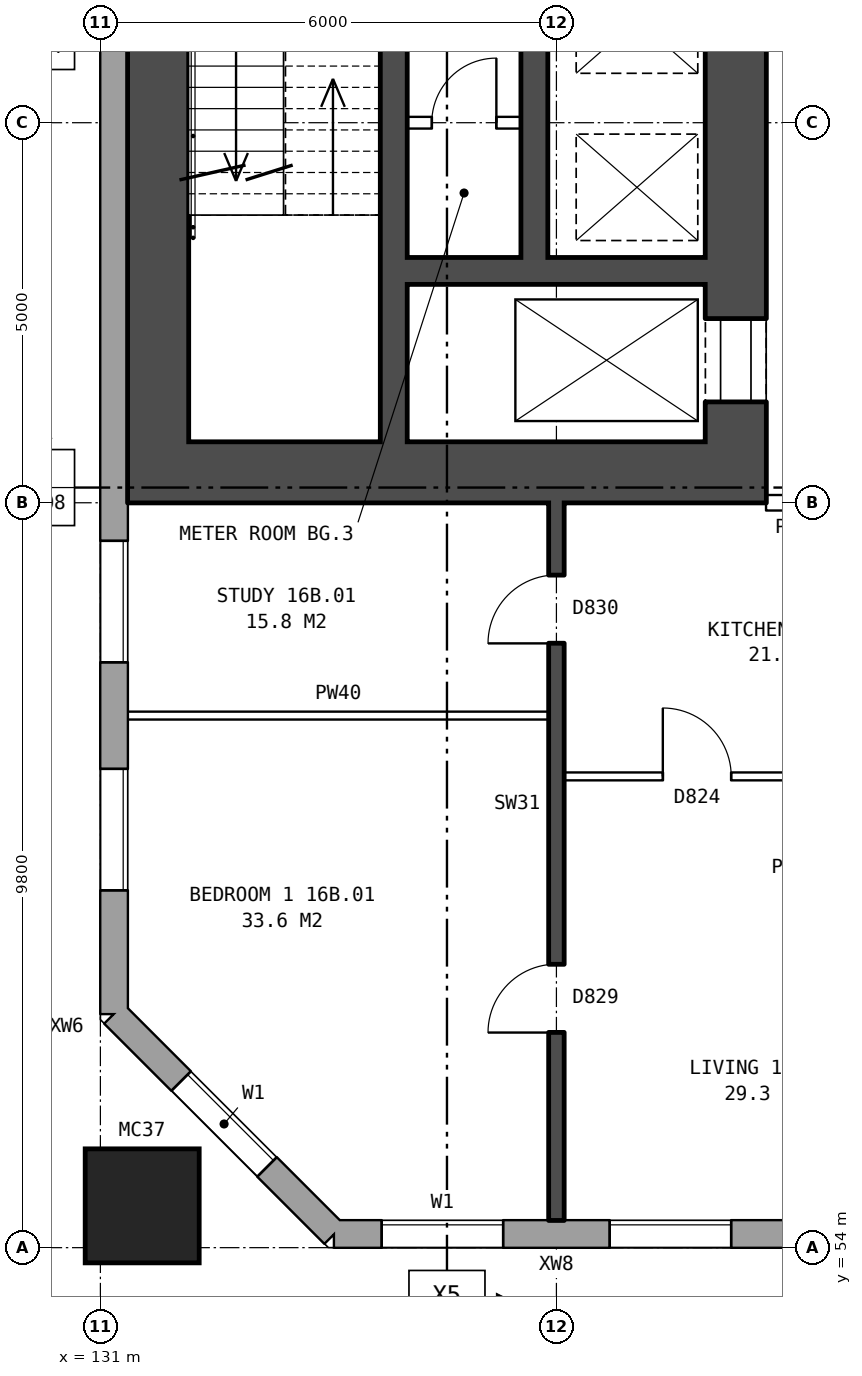
"""IFC4 building model, lengths in metres.
Left out: names, types, materials, properties, quantities, classifications, styles, units other than length and angle.
Written with IfcOpenShell. Run it as: python <this file> out.ifc"""

import sys

from ifc_helpers import new_model, si_unit, direction, frame, frame_2d, origin, origin_2d, place, context, subcontext, project, spatial, rectangle, hollow_rectangle, extrude, element, fill, save


model = new_model("IFC4")
c1 = context("Model", 3, precision=1e-05, world=origin(), true_north=direction((0.0, 1.0)))
c2 = subcontext(c1, "Body", "Model", "MODEL_VIEW")
j1 = project(units=[si_unit("LENGTHUNIT", "METRE"), si_unit("PLANEANGLEUNIT", "RADIAN")], contexts=[c1])
p1 = place(None, origin())
s1 = spatial("IfcSite", under=j1, at=p1, CompositionType="ELEMENT")
p2 = place(p1, origin())
s2 = spatial("IfcBuilding", under=s1, at=p2, CompositionType="ELEMENT")
p3 = place(p2, frame((0.0, 0.0, 59.8)))
s3 = spatial("IfcBuildingStorey", under=s2, at=p3, CompositionType="ELEMENT", Elevation=59.8)
p4 = place(p3, frame((131.55, 54.55, 0.0), z_axis=(0.0, 0.0, 1.0), x_axis=(1.0, 0.0, 0.0)))
e1 = element("IfcColumn", 1, at=p4, inside=s3, PredefinedType="COLUMN", context=c2, shape_type="SweptSolid", body=[
    extrude(hollow_rectangle(XDim=1.5, YDim=1.5, WallThickness=0.08, at=origin_2d()), origin(), (0.0, 0.0, 1.0), 3.1),
])
p5 = place(p3, frame((131.18, 57.075, 0.0), z_axis=(0.0, 0.0, 1.0), x_axis=(0.707106781187, -0.707106781187, 0.0)))
e2 = element("IfcWall", 2, at=p5, inside=s3, PredefinedType="STANDARD", context=c2, shape_type="SweptSolid", body=[
    extrude(rectangle(XDim=4.094, YDim=0.36, at=frame_2d((2.047, 0.0))), origin(), (0.0, 0.0, 1.0), 2.85),
])
p6 = place(p5, frame((1.247, 0.0, 0.8)))
e3 = element("IfcOpeningElement", 3, at=p6, cuts=e2, PredefinedType="OPENING", context=c2, shape_type="SweptSolid", body=[
    extrude(rectangle(XDim=1.6, YDim=1.8, at=frame_2d((0.8, 0.9))), frame((0.0, 0.19, 0.0), z_axis=(0.0, -1.0, 0.0), x_axis=(1.0, 0.0, 0.0)), (0.0, 0.0, 1.0), 0.38),
])
p7 = place(p3, frame((134.075, 54.18, 0.0), z_axis=(0.0, 0.0, 1.0), x_axis=(1.0, 0.0, 0.0)))
e4 = element("IfcWall", 4, at=p7, inside=s3, PredefinedType="STANDARD", context=c2, shape_type="SweptSolid", body=[
    extrude(rectangle(XDim=39.351, YDim=0.36, at=frame_2d((19.675, 0.0))), origin(), (0.0, 0.0, 1.0), 2.85),
])
p8 = place(p7, frame((0.625, 0.0, 0.8)))
e5 = element("IfcOpeningElement", 5, at=p8, cuts=e4, PredefinedType="OPENING", context=c2, shape_type="SweptSolid", body=[
    extrude(rectangle(XDim=1.6, YDim=1.8, at=frame_2d((0.8, 0.9))), frame((0.0, 0.19, 0.0), z_axis=(0.0, -1.0, 0.0), x_axis=(1.0, 0.0, 0.0)), (0.0, 0.0, 1.0), 0.38),
])
p9 = place(p7, frame((3.625, 0.0, 0.8)))
e6 = element("IfcOpeningElement", 6, at=p9, cuts=e4, PredefinedType="OPENING", context=c2, shape_type="SweptSolid", body=[
    extrude(rectangle(XDim=1.6, YDim=1.8, at=frame_2d((0.8, 0.9))), frame((0.0, 0.19, 0.0), z_axis=(0.0, -1.0, 0.0), x_axis=(1.0, 0.0, 0.0)), (0.0, 0.0, 1.0), 0.38),
])
p10 = place(p7, frame((6.625, 0.0, 0.8)))
e7 = element("IfcOpeningElement", 7, at=p10, cuts=e4, PredefinedType="OPENING", context=c2, shape_type="SweptSolid", body=[
    extrude(rectangle(XDim=1.6, YDim=1.8, at=frame_2d((0.8, 0.9))), frame((0.0, 0.19, 0.0), z_axis=(0.0, -1.0, 0.0), x_axis=(1.0, 0.0, 0.0)), (0.0, 0.0, 1.0), 0.38),
])
p11 = place(p7, frame((9.625, 0.0, 0.8)))
e8 = element("IfcOpeningElement", 8, at=p11, cuts=e4, PredefinedType="OPENING", context=c2, shape_type="SweptSolid", body=[
    extrude(rectangle(XDim=1.6, YDim=1.8, at=frame_2d((0.8, 0.9))), frame((0.0, 0.19, 0.0), z_axis=(0.0, -1.0, 0.0), x_axis=(1.0, 0.0, 0.0)), (0.0, 0.0, 1.0), 0.38),
])
p12 = place(p7, frame((12.625, 0.0, 0.8)))
e9 = element("IfcOpeningElement", 9, at=p12, cuts=e4, PredefinedType="OPENING", context=c2, shape_type="SweptSolid", body=[
    extrude(rectangle(XDim=1.6, YDim=1.8, at=frame_2d((0.8, 0.9))), frame((0.0, 0.19, 0.0), z_axis=(0.0, -1.0, 0.0), x_axis=(1.0, 0.0, 0.0)), (0.0, 0.0, 1.0), 0.38),
])
p13 = place(p7, frame((15.125, 0.0, 0.8)))
e10 = element("IfcOpeningElement", 10, at=p13, cuts=e4, PredefinedType="OPENING", context=c2, shape_type="SweptSolid", body=[
    extrude(rectangle(XDim=1.6, YDim=1.8, at=frame_2d((0.8, 0.9))), frame((0.0, 0.19, 0.0), z_axis=(0.0, -1.0, 0.0), x_axis=(1.0, 0.0, 0.0)), (0.0, 0.0, 1.0), 0.38),
])
p14 = place(p7, frame((18.275, 0.0, 0.15)))
e11 = element("IfcOpeningElement", 11, at=p14, cuts=e4, PredefinedType="OPENING", context=c2, shape_type="SweptSolid", body=[
    extrude(rectangle(XDim=0.6, YDim=0.9, at=frame_2d((0.3, 0.45))), frame((0.0, 0.19, 0.0), z_axis=(0.0, -1.0, 0.0), x_axis=(1.0, 0.0, 0.0)), (0.0, 0.0, 1.0), 0.38),
])
p15 = place(p7, frame((21.525, 0.0, 1.7)))
e12 = element("IfcOpeningElement", 12, at=p15, cuts=e4, PredefinedType="OPENING", context=c2, shape_type="SweptSolid", body=[
    extrude(rectangle(XDim=0.6, YDim=0.9, at=frame_2d((0.3, 0.45))), frame((0.0, 0.19, 0.0), z_axis=(0.0, -1.0, 0.0), x_axis=(1.0, 0.0, 0.0)), (0.0, 0.0, 1.0), 0.38),
])
p16 = place(p7, frame((24.625, 0.0, 0.8)))
e13 = element("IfcOpeningElement", 13, at=p16, cuts=e4, PredefinedType="OPENING", context=c2, shape_type="SweptSolid", body=[
    extrude(rectangle(XDim=1.6, YDim=1.8, at=frame_2d((0.8, 0.9))), frame((0.0, 0.19, 0.0), z_axis=(0.0, -1.0, 0.0), x_axis=(1.0, 0.0, 0.0)), (0.0, 0.0, 1.0), 0.38),
])
p17 = place(p7, frame((27.625, 0.0, 0.8)))
e14 = element("IfcOpeningElement", 14, at=p17, cuts=e4, PredefinedType="OPENING", context=c2, shape_type="SweptSolid", body=[
    extrude(rectangle(XDim=1.6, YDim=1.8, at=frame_2d((0.8, 0.9))), frame((0.0, 0.19, 0.0), z_axis=(0.0, -1.0, 0.0), x_axis=(1.0, 0.0, 0.0)), (0.0, 0.0, 1.0), 0.38),
])
p18 = place(p7, frame((30.625, 0.0, 0.8)))
e15 = element("IfcOpeningElement", 15, at=p18, cuts=e4, PredefinedType="OPENING", context=c2, shape_type="SweptSolid", body=[
    extrude(rectangle(XDim=1.6, YDim=1.8, at=frame_2d((0.8, 0.9))), frame((0.0, 0.19, 0.0), z_axis=(0.0, -1.0, 0.0), x_axis=(1.0, 0.0, 0.0)), (0.0, 0.0, 1.0), 0.38),
])
p19 = place(p7, frame((33.625, 0.0, 0.8)))
e16 = element("IfcOpeningElement", 16, at=p19, cuts=e4, PredefinedType="OPENING", context=c2, shape_type="SweptSolid", body=[
    extrude(rectangle(XDim=1.6, YDim=1.8, at=frame_2d((0.8, 0.9))), frame((0.0, 0.19, 0.0), z_axis=(0.0, -1.0, 0.0), x_axis=(1.0, 0.0, 0.0)), (0.0, 0.0, 1.0), 0.38),
])
p20 = place(p7, frame((36.625, 0.0, 0.8)))
e17 = element("IfcOpeningElement", 17, at=p20, cuts=e4, PredefinedType="OPENING", context=c2, shape_type="SweptSolid", body=[
    extrude(rectangle(XDim=1.6, YDim=1.8, at=frame_2d((0.8, 0.9))), frame((0.0, 0.19, 0.0), z_axis=(0.0, -1.0, 0.0), x_axis=(1.0, 0.0, 0.0)), (0.0, 0.0, 1.0), 0.38),
])
p21 = place(p7, frame((17.025, 0.0, 1.6)))
e18 = element("IfcOpeningElement", 18, at=p21, cuts=e4, PredefinedType="OPENING", context=c2, shape_type="SweptSolid", body=[
    extrude(rectangle(XDim=0.6, YDim=0.9, at=frame_2d((0.3, 0.45))), frame((0.0, 0.19, 0.0), z_axis=(0.0, -1.0, 0.0), x_axis=(1.0, 0.0, 0.0)), (0.0, 0.0, 1.0), 0.38),
])
p22 = place(p7, frame((19.175, 0.0, 0.25)))
e19 = element("IfcOpeningElement", 19, at=p22, cuts=e4, PredefinedType="OPENING", context=c2, shape_type="SweptSolid", body=[
    extrude(rectangle(XDim=1.4, YDim=1.2, at=frame_2d((0.7, 0.6))), frame((0.0, 0.19, 0.0), z_axis=(0.0, -1.0, 0.0), x_axis=(1.0, 0.0, 0.0)), (0.0, 0.0, 1.0), 0.38),
])
p23 = place(p7, frame((22.425, 0.0, 1.0)))
e20 = element("IfcOpeningElement", 20, at=p23, cuts=e4, PredefinedType="OPENING", context=c2, shape_type="SweptSolid", body=[
    extrude(rectangle(XDim=0.6, YDim=1.5, at=frame_2d((0.3, 0.75))), frame((0.0, 0.19, 0.0), z_axis=(0.0, -1.0, 0.0), x_axis=(1.0, 0.0, 0.0)), (0.0, 0.0, 1.0), 0.38),
])
p24 = place(p7, frame((23.325, 0.0, 0.8)))
e21 = element("IfcOpeningElement", 21, at=p24, cuts=e4, PredefinedType="OPENING", context=c2, shape_type="SweptSolid", body=[
    extrude(rectangle(XDim=1.0, YDim=1.8, at=frame_2d((0.5, 0.9))), frame((0.0, 0.19, 0.0), z_axis=(0.0, -1.0, 0.0), x_axis=(1.0, 0.0, 0.0)), (0.0, 0.0, 1.0), 0.38),
])
p25 = place(p3, frame((131.18, 82.925, 0.0), z_axis=(0.0, 0.0, 1.0), x_axis=(0.0, -1.0, 0.0)))
e22 = element("IfcWall", 22, at=p25, inside=s3, PredefinedType="STANDARD", context=c2, shape_type="SweptSolid", body=[
    extrude(rectangle(XDim=25.851, YDim=0.36, at=frame_2d((12.925, 0.0))), origin(), (0.0, 0.0, 1.0), 2.85),
])
p26 = place(p25, frame((1.625, 0.0, 0.8)))
e23 = element("IfcOpeningElement", 23, at=p26, cuts=e22, PredefinedType="OPENING", context=c2, shape_type="SweptSolid", body=[
    extrude(rectangle(XDim=1.6, YDim=1.8, at=frame_2d((0.8, 0.9))), frame((0.0, 0.19, 0.0), z_axis=(0.0, -1.0, 0.0), x_axis=(1.0, 0.0, 0.0)), (0.0, 0.0, 1.0), 0.38),
])
p27 = place(p25, frame((4.625, 0.0, 0.8)))
e24 = element("IfcOpeningElement", 24, at=p27, cuts=e22, PredefinedType="OPENING", context=c2, shape_type="SweptSolid", body=[
    extrude(rectangle(XDim=1.6, YDim=1.8, at=frame_2d((0.8, 0.9))), frame((0.0, 0.19, 0.0), z_axis=(0.0, -1.0, 0.0), x_axis=(1.0, 0.0, 0.0)), (0.0, 0.0, 1.0), 0.38),
])
p28 = place(p25, frame((19.625, 0.0, 0.8)))
e25 = element("IfcOpeningElement", 25, at=p28, cuts=e22, PredefinedType="OPENING", context=c2, shape_type="SweptSolid", body=[
    extrude(rectangle(XDim=1.6, YDim=1.8, at=frame_2d((0.8, 0.9))), frame((0.0, 0.19, 0.0), z_axis=(0.0, -1.0, 0.0), x_axis=(1.0, 0.0, 0.0)), (0.0, 0.0, 1.0), 0.38),
])
p29 = place(p25, frame((22.625, 0.0, 0.8)))
e26 = element("IfcOpeningElement", 26, at=p29, cuts=e22, PredefinedType="OPENING", context=c2, shape_type="SweptSolid", body=[
    extrude(rectangle(XDim=1.6, YDim=1.8, at=frame_2d((0.8, 0.9))), frame((0.0, 0.19, 0.0), z_axis=(0.0, -1.0, 0.0), x_axis=(1.0, 0.0, 0.0)), (0.0, 0.0, 1.0), 0.38),
])
p30 = place(p3, frame((139.36, 64.6, 0.0), z_axis=(0.0, 0.0, 1.0), x_axis=(0.0, 1.0, 0.0)))
e27 = element("IfcWall", 27, at=p30, inside=s3, PredefinedType="SHEAR", context=c2, shape_type="SweptSolid", body=[
    extrude(rectangle(XDim=10.8, YDim=0.8, at=frame_2d((5.4, 0.0))), origin(), (0.0, 0.0, 1.0), 2.85),
])
p31 = place(p30, frame((0.525, 0.0, 0.0)))
e28 = element("IfcOpeningElement", 28, at=p31, cuts=e27, PredefinedType="OPENING", context=c2, shape_type="SweptSolid", body=[
    extrude(rectangle(XDim=1.1, YDim=2.1, at=frame_2d((0.55, 1.05))), frame((0.0, 0.41, 0.0), z_axis=(0.0, -1.0, 0.0), x_axis=(1.0, 0.0, 0.0)), (0.0, 0.0, 1.0), 0.82),
])
p32 = place(p30, frame((9.1, 0.0, 0.0)))
e29 = element("IfcOpeningElement", 29, at=p32, cuts=e27, PredefinedType="OPENING", context=c2, shape_type="SweptSolid", body=[
    extrude(rectangle(XDim=1.1, YDim=2.1, at=frame_2d((0.55, 1.05))), frame((0.0, 0.41, 0.0), z_axis=(0.0, -1.0, 0.0), x_axis=(1.0, 0.0, 0.0)), (0.0, 0.0, 1.0), 0.82),
])
p33 = place(p30, frame((7.325, 0.0, 0.0)))
e30 = element("IfcOpeningElement", 30, at=p33, cuts=e27, PredefinedType="OPENING", context=c2, shape_type="SweptSolid", body=[
    extrude(rectangle(XDim=0.85, YDim=2.1, at=frame_2d((0.425, 1.05))), frame((0.0, 0.41, 0.0), z_axis=(0.0, -1.0, 0.0), x_axis=(1.0, 0.0, 0.0)), (0.0, 0.0, 1.0), 0.82),
])
p34 = place(p3, frame((131.76, 64.6, 0.0), z_axis=(0.0, 0.0, 1.0), x_axis=(0.0, 1.0, 0.0)))
e31 = element("IfcWall", 31, at=p34, inside=s3, PredefinedType="SHEAR", context=c2, shape_type="SweptSolid", body=[
    extrude(rectangle(XDim=10.8, YDim=0.8, at=frame_2d((5.4, 0.0))), origin(), (0.0, 0.0, 1.0), 2.85),
])
p35 = place(p3, frame((139.76, 64.2, 0.0), z_axis=(0.0, 0.0, 1.0), x_axis=(-1.0, 0.0, 0.0)))
e32 = element("IfcWall", 32, at=p35, inside=s3, PredefinedType="SHEAR", context=c2, shape_type="SweptSolid", body=[
    extrude(rectangle(XDim=8.4, YDim=0.8, at=frame_2d((4.2, 0.0))), origin(), (0.0, 0.0, 1.0), 2.85),
])
p36 = place(p3, frame((138.96, 66.85, 0.0), z_axis=(0.0, 0.0, 1.0), x_axis=(-1.0, 0.0, 0.0)))
e33 = element("IfcWall", 33, at=p36, inside=s3, PredefinedType="SHEAR", context=c2, shape_type="SweptSolid", body=[
    extrude(rectangle(XDim=3.925, YDim=0.35, at=frame_2d((1.962, 0.0))), origin(), (0.0, 0.0, 1.0), 2.85),
])
p37 = place(p3, frame((136.535, 68.8, 0.0), z_axis=(0.0, 0.0, 1.0), x_axis=(-1.0, 0.0, 0.0)))
e34 = element("IfcWall", 34, at=p37, inside=s3, PredefinedType="PARTITIONING", context=c2, shape_type="SweptSolid", body=[
    extrude(rectangle(XDim=1.5, YDim=0.15, at=frame_2d((0.75, 0.0))), origin(), (0.0, 0.0, 1.0), 2.85),
])
p38 = place(p37, frame((0.325, 0.0, 0.0)))
e35 = element("IfcOpeningElement", 35, at=p38, cuts=e34, PredefinedType="OPENING", context=c2, shape_type="SweptSolid", body=[
    extrude(rectangle(XDim=0.85, YDim=2.1, at=frame_2d((0.425, 1.05))), frame((0.0, 0.085, 0.0), z_axis=(0.0, -1.0, 0.0), x_axis=(1.0, 0.0, 0.0)), (0.0, 0.0, 1.0), 0.17),
])
p39 = place(p3, frame((136.71, 67.025, 0.0), z_axis=(0.0, 0.0, 1.0), x_axis=(0.0, 1.0, 0.0)))
e36 = element("IfcWall", 36, at=p39, inside=s3, PredefinedType="SHEAR", context=c2, shape_type="SweptSolid", body=[
    extrude(rectangle(XDim=4.05, YDim=0.35, at=frame_2d((2.025, 0.0))), origin(), (0.0, 0.0, 1.0), 2.85),
])
p40 = place(p3, frame((134.86, 64.6, 0.0), z_axis=(0.0, 0.0, 1.0), x_axis=(0.0, 1.0, 0.0)))
e37 = element("IfcWall", 37, at=p40, inside=s3, PredefinedType="SHEAR", context=c2, shape_type="SweptSolid", body=[
    extrude(rectangle(XDim=6.475, YDim=0.35, at=frame_2d((3.237, 0.0))), origin(), (0.0, 0.0, 1.0), 2.85),
])
p41 = place(p3, frame((137.1, 60.2, 0.0), z_axis=(0.0, 0.0, 1.0), x_axis=(1.0, 0.0, 0.0)))
e38 = element("IfcWall", 38, at=p41, inside=s3, PredefinedType="PARTITIONING", context=c2, shape_type="SweptSolid", body=[
    extrude(rectangle(XDim=5.8, YDim=0.1, at=frame_2d((2.9, 0.0))), origin(), (0.0, 0.0, 1.0), 2.85),
])
p42 = place(p41, frame((1.3, 0.0, 0.0)))
e39 = element("IfcOpeningElement", 39, at=p42, cuts=e38, PredefinedType="OPENING", context=c2, shape_type="SweptSolid", body=[
    extrude(rectangle(XDim=0.9, YDim=2.1, at=frame_2d((0.45, 1.05))), frame((0.0, 0.06, 0.0), z_axis=(0.0, -1.0, 0.0), x_axis=(1.0, 0.0, 0.0)), (0.0, 0.0, 1.0), 0.12),
])
p43 = place(p41, frame((4.2, 0.0, 0.0)))
e40 = element("IfcOpeningElement", 40, at=p43, cuts=e38, PredefinedType="OPENING", context=c2, shape_type="SweptSolid", body=[
    extrude(rectangle(XDim=0.9, YDim=2.1, at=frame_2d((0.45, 1.05))), frame((0.0, 0.06, 0.0), z_axis=(0.0, -1.0, 0.0), x_axis=(1.0, 0.0, 0.0)), (0.0, 0.0, 1.0), 0.12),
])
p44 = place(p3, frame((131.36, 61.0, 0.0), z_axis=(0.0, 0.0, 1.0), x_axis=(1.0, 0.0, 0.0)))
e41 = element("IfcWall", 41, at=p44, inside=s3, PredefinedType="PARTITIONING", context=c2, shape_type="SweptSolid", body=[
    extrude(rectangle(XDim=5.54, YDim=0.1, at=frame_2d((2.77, 0.0))), origin(), (0.0, 0.0, 1.0), 2.85),
])
p45 = place(p3, frame((139.76, 63.8, 0.0), z_axis=(0.0, 0.0, 1.0), x_axis=(1.0, 0.0, 0.0)))
e42 = element("IfcWall", 42, at=p45, inside=s3, PredefinedType="PARTITIONING", context=c2, shape_type="SweptSolid", body=[
    extrude(rectangle(XDim=3.0, YDim=0.2, at=frame_2d((1.5, 0.0))), origin(), (0.0, 0.0, 1.0), 2.85),
])
p46 = place(p45, frame((1.0, 0.0, 0.0)))
e43 = element("IfcOpeningElement", 43, at=p46, cuts=e42, PredefinedType="OPENING", context=c2, shape_type="SweptSolid", body=[
    extrude(rectangle(XDim=1.0, YDim=2.1, at=frame_2d((0.5, 1.05))), frame((0.0, 0.11, 0.0), z_axis=(0.0, -1.0, 0.0), x_axis=(1.0, 0.0, 0.0)), (0.0, 0.0, 1.0), 0.22),
])
p47 = place(p3, frame((137.0, 54.36, 0.0), z_axis=(0.0, 0.0, 1.0), x_axis=(0.0, 1.0, 0.0)))
e44 = element("IfcWall", 44, at=p47, inside=s3, PredefinedType="SOLIDWALL", context=c2, shape_type="SweptSolid", body=[
    extrude(rectangle(XDim=9.44, YDim=0.2, at=frame_2d((4.72, 0.0))), origin(), (0.0, 0.0, 1.0), 2.85),
])
p48 = place(p47, frame((2.47, 0.0, 0.0)))
e45 = element("IfcOpeningElement", 45, at=p48, cuts=e44, PredefinedType="OPENING", context=c2, shape_type="SweptSolid", body=[
    extrude(rectangle(XDim=0.9, YDim=2.1, at=frame_2d((0.45, 1.05))), frame((0.0, 0.11, 0.0), z_axis=(0.0, -1.0, 0.0), x_axis=(1.0, 0.0, 0.0)), (0.0, 0.0, 1.0), 0.22),
])
p49 = place(p47, frame((7.59, 0.0, 0.0)))
e46 = element("IfcOpeningElement", 46, at=p49, cuts=e44, PredefinedType="OPENING", context=c2, shape_type="SweptSolid", body=[
    extrude(rectangle(XDim=0.9, YDim=2.1, at=frame_2d((0.45, 1.05))), frame((0.0, 0.11, 0.0), z_axis=(0.0, -1.0, 0.0), x_axis=(1.0, 0.0, 0.0)), (0.0, 0.0, 1.0), 0.22),
])
p50 = place(p6, origin())
e47 = element("IfcWindow", 47, at=p50, inside=s3, PartitioningType="SINGLE_PANEL", PredefinedType="WINDOW", context=c2, shape_type="SweptSolid", body=[
    extrude(rectangle(XDim=1.6, YDim=1.8, at=frame_2d((0.8, 0.9))), frame((0.0, 0.15, 0.0), z_axis=(0.0, -1.0, 0.0), x_axis=(1.0, 0.0, 0.0)), (0.0, 0.0, 1.0), 0.06),
])
fill(e3, e47)
p51 = place(p8, origin())
e48 = element("IfcWindow", 48, at=p51, inside=s3, PartitioningType="SINGLE_PANEL", PredefinedType="WINDOW", context=c2, shape_type="SweptSolid", body=[
    extrude(rectangle(XDim=1.6, YDim=1.8, at=frame_2d((0.8, 0.9))), frame((0.0, 0.15, 0.0), z_axis=(0.0, -1.0, 0.0), x_axis=(1.0, 0.0, 0.0)), (0.0, 0.0, 1.0), 0.06),
])
fill(e5, e48)
p52 = place(p9, origin())
e49 = element("IfcWindow", 49, at=p52, inside=s3, PartitioningType="SINGLE_PANEL", PredefinedType="WINDOW", context=c2, shape_type="SweptSolid", body=[
    extrude(rectangle(XDim=1.6, YDim=1.8, at=frame_2d((0.8, 0.9))), frame((0.0, 0.15, 0.0), z_axis=(0.0, -1.0, 0.0), x_axis=(1.0, 0.0, 0.0)), (0.0, 0.0, 1.0), 0.06),
])
fill(e6, e49)
p53 = place(p28, origin())
e50 = element("IfcWindow", 50, at=p53, inside=s3, PartitioningType="SINGLE_PANEL", PredefinedType="WINDOW", context=c2, shape_type="SweptSolid", body=[
    extrude(rectangle(XDim=1.6, YDim=1.8, at=frame_2d((0.8, 0.9))), frame((0.0, 0.15, 0.0), z_axis=(0.0, -1.0, 0.0), x_axis=(1.0, 0.0, 0.0)), (0.0, 0.0, 1.0), 0.06),
])
fill(e25, e50)
p54 = place(p29, origin())
e51 = element("IfcWindow", 51, at=p54, inside=s3, PartitioningType="SINGLE_PANEL", PredefinedType="WINDOW", context=c2, shape_type="SweptSolid", body=[
    extrude(rectangle(XDim=1.6, YDim=1.8, at=frame_2d((0.8, 0.9))), frame((0.0, 0.15, 0.0), z_axis=(0.0, -1.0, 0.0), x_axis=(1.0, 0.0, 0.0)), (0.0, 0.0, 1.0), 0.06),
])
fill(e26, e51)
p55 = place(p31, origin())
e52 = element("IfcDoor", 52, at=p55, inside=s3, OperationType="DOUBLE_DOOR_SLIDING", PredefinedType="DOOR", context=c2, shape_type="SweptSolid", body=[
    extrude(rectangle(XDim=1.1, YDim=2.1, at=frame_2d((0.55, 1.05))), frame((0.0, 0.385, 0.0), z_axis=(0.0, -1.0, 0.0), x_axis=(1.0, 0.0, 0.0)), (0.0, 0.0, 1.0), 0.05),
])
fill(e28, e52)
p56 = place(p38, frame((0.85, 0.0, 0.0), z_axis=(0.0, 0.0, 1.0), x_axis=(-1.0, 0.0, 0.0)))
e53 = element("IfcDoor", 53, at=p56, inside=s3, OperationType="SINGLE_SWING_RIGHT", PredefinedType="DOOR", context=c2, shape_type="SweptSolid", body=[
    extrude(rectangle(XDim=0.85, YDim=2.1, at=frame_2d((0.425, 1.05))), frame((0.0, 0.025, 0.0), z_axis=(0.0, -1.0, 0.0), x_axis=(1.0, 0.0, 0.0)), (0.0, 0.0, 1.0), 0.05),
])
fill(e35, e53)
p57 = place(p48, origin())
e54 = element("IfcDoor", 54, at=p57, inside=s3, OperationType="SINGLE_SWING_LEFT", PredefinedType="DOOR", context=c2, shape_type="SweptSolid", body=[
    extrude(rectangle(XDim=0.9, YDim=2.1, at=frame_2d((0.45, 1.05))), frame((0.0, 0.025, 0.0), z_axis=(0.0, -1.0, 0.0), x_axis=(1.0, 0.0, 0.0)), (0.0, 0.0, 1.0), 0.05),
])
fill(e45, e54)
p58 = place(p49, origin())
e55 = element("IfcDoor", 55, at=p58, inside=s3, OperationType="SINGLE_SWING_LEFT", PredefinedType="DOOR", context=c2, shape_type="SweptSolid", body=[
    extrude(rectangle(XDim=0.9, YDim=2.1, at=frame_2d((0.45, 1.05))), frame((0.0, 0.025, 0.0), z_axis=(0.0, -1.0, 0.0), x_axis=(1.0, 0.0, 0.0)), (0.0, 0.0, 1.0), 0.05),
])
fill(e46, e55)
p59 = place(p42, origin())
e56 = element("IfcDoor", 56, at=p59, inside=s3, OperationType="SINGLE_SWING_LEFT", PredefinedType="DOOR", context=c2, shape_type="SweptSolid", body=[
    extrude(rectangle(XDim=0.9, YDim=2.1, at=frame_2d((0.45, 1.05))), frame((0.0, 0.025, 0.0), z_axis=(0.0, -1.0, 0.0), x_axis=(1.0, 0.0, 0.0)), (0.0, 0.0, 1.0), 0.05),
])
fill(e39, e56)
save(model, sys.argv[1])
